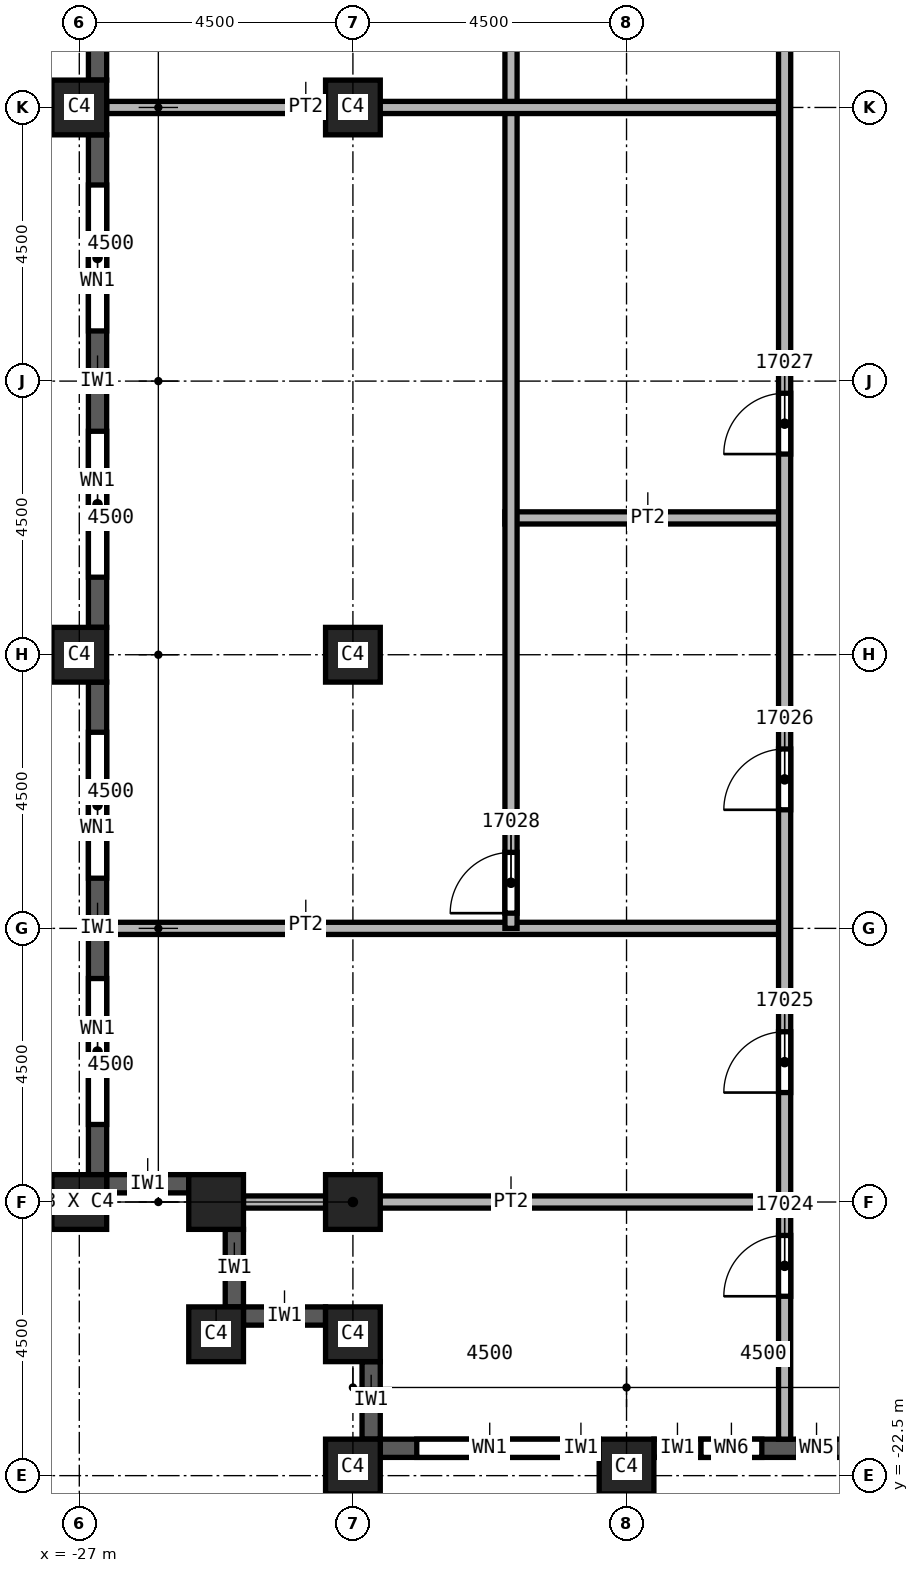
"""IFC4 building model, lengths in metres.
Left out: names, types, materials, properties, quantities, classifications, styles, units other than length and angle.
Written with IfcOpenShell. Run it as: python <this file> out.ifc"""

import sys

from ifc_helpers import new_model, si_unit, direction, frame, frame_2d, origin, origin_2d, place, context, subcontext, project, spatial, rectangle, extrude, element, fill, save


model = new_model("IFC4")
c1 = context("Model", 3, precision=1e-05, world=origin(), true_north=direction((0.0, 1.0)))
c2 = subcontext(c1, "Body", "Model", "MODEL_VIEW")
j1 = project(units=[si_unit("LENGTHUNIT", "METRE"), si_unit("PLANEANGLEUNIT", "RADIAN")], contexts=[c1])
p1 = place(None, origin())
s1 = spatial("IfcSite", under=j1, at=p1, CompositionType="ELEMENT")
p2 = place(p1, origin())
s2 = spatial("IfcBuilding", under=s1, at=p2, CompositionType="ELEMENT")
p3 = place(p2, frame((0.0, 0.0, 254.0)))
s3 = spatial("IfcBuildingStorey", under=s2, at=p3, CompositionType="ELEMENT", Elevation=254.0)
for number, where, z_axis, x_axis in (
    (1, (-22.5, 0.0, 0.0), (0.0, 0.0, 1.0), (1.0, 0.0, 0.0)),
    (2, (-22.5, -9.0, 0.0), (0.0, 0.0, 1.0), (1.0, 0.0, 0.0)),
    (3, (-22.5, -18.0, 0.0), (0.0, 0.0, 1.0), (1.0, 0.0, 0.0)),
    (4, (-18.0, -22.35, 0.0), (0.0, 0.0, 1.0), (1.0, 0.0, 0.0)),
    (5, (-22.5, -22.35, 0.0), (0.0, 0.0, 1.0), (1.0, 0.0, 0.0)),
    (6, (-27.0, 0.0, 0.0), (0.0, 0.0, 1.0), (0.0, 1.0, 0.0)),
    (7, (-27.0, -9.0, 0.0), (0.0, 0.0, 1.0), (0.0, 1.0, 0.0)),
    (8, (-27.0, -18.0, 0.0), (0.0, 0.0, 1.0), (0.0, 1.0, 0.0)),
    (9, (-22.5, -20.175, 0.0), (0.0, 0.0, 1.0), (1.0, 0.0, 0.0)),
    (10, (-24.75, -20.175, 0.0), (0.0, 0.0, 1.0), (1.0, 0.0, 0.0)),
    (11, (-24.75, -18.0, 0.0), (0.0, 0.0, 1.0), (1.0, 0.0, 0.0)),
):
    element("IfcColumn", number, at=place(p3, frame(where, z_axis=z_axis, x_axis=x_axis)), inside=s3, PredefinedType="COLUMN", context=c2, shape_type="SweptSolid", body=[
        extrude(rectangle(XDim=0.9, YDim=0.9, at=origin_2d()), origin(), (0.0, 0.0, 1.0), 3.72),
    ])
p4 = place(p3, frame((-26.7, 8.55, 0.0), z_axis=(0.0, 0.0, 1.0), x_axis=(0.0, -1.0, 0.0)))
e12 = element("IfcWall", 12, at=p4, inside=s3, PredefinedType="SOLIDWALL", context=c2, shape_type="SweptSolid", body=[
    extrude(rectangle(XDim=8.1, YDim=0.3, at=frame_2d((4.05, 0.0))), origin(), (0.0, 0.0, 1.0), 3.12),
])
p5 = place(p4, frame((0.825, 0.0, 0.8)))
e13 = element("IfcOpeningElement", 13, at=p5, cuts=e12, PredefinedType="OPENING", context=c2, shape_type="SweptSolid", body=[
    extrude(rectangle(XDim=2.4, YDim=1.95, at=frame_2d((1.2, 0.975))), frame((0.0, 0.15, 0.0), z_axis=(0.0, -1.0, 0.0), x_axis=(1.0, 0.0, 0.0)), (0.0, 0.0, 1.0), 0.3),
])
p6 = place(p4, frame((4.875, 0.0, 0.8)))
e14 = element("IfcOpeningElement", 14, at=p6, cuts=e12, PredefinedType="OPENING", context=c2, shape_type="SweptSolid", body=[
    extrude(rectangle(XDim=2.4, YDim=1.95, at=frame_2d((1.2, 0.975))), frame((0.0, 0.15, 0.0), z_axis=(0.0, -1.0, 0.0), x_axis=(1.0, 0.0, 0.0)), (0.0, 0.0, 1.0), 0.3),
])
p7 = place(p3, frame((-26.7, -0.45, 0.0), z_axis=(0.0, 0.0, 1.0), x_axis=(0.0, -1.0, 0.0)))
e15 = element("IfcWall", 15, at=p7, inside=s3, PredefinedType="SOLIDWALL", context=c2, shape_type="SweptSolid", body=[
    extrude(rectangle(XDim=8.1, YDim=0.3, at=frame_2d((4.05, 0.0))), origin(), (0.0, 0.0, 1.0), 3.12),
])
p8 = place(p7, frame((0.825, 0.0, 0.8)))
e16 = element("IfcOpeningElement", 16, at=p8, cuts=e15, PredefinedType="OPENING", context=c2, shape_type="SweptSolid", body=[
    extrude(rectangle(XDim=2.4, YDim=1.95, at=frame_2d((1.2, 0.975))), frame((0.0, 0.15, 0.0), z_axis=(0.0, -1.0, 0.0), x_axis=(1.0, 0.0, 0.0)), (0.0, 0.0, 1.0), 0.3),
])
p9 = place(p7, frame((4.875, 0.0, 0.8)))
e17 = element("IfcOpeningElement", 17, at=p9, cuts=e15, PredefinedType="OPENING", context=c2, shape_type="SweptSolid", body=[
    extrude(rectangle(XDim=2.4, YDim=1.95, at=frame_2d((1.2, 0.975))), frame((0.0, 0.15, 0.0), z_axis=(0.0, -1.0, 0.0), x_axis=(1.0, 0.0, 0.0)), (0.0, 0.0, 1.0), 0.3),
])
p10 = place(p3, frame((-26.7, -9.45, 0.0), z_axis=(0.0, 0.0, 1.0), x_axis=(0.0, -1.0, 0.0)))
e18 = element("IfcWall", 18, at=p10, inside=s3, PredefinedType="SOLIDWALL", context=c2, shape_type="SweptSolid", body=[
    extrude(rectangle(XDim=8.1, YDim=0.3, at=frame_2d((4.05, 0.0))), origin(), (0.0, 0.0, 1.0), 3.12),
])
p11 = place(p10, frame((0.825, 0.0, 0.8)))
e19 = element("IfcOpeningElement", 19, at=p11, cuts=e18, PredefinedType="OPENING", context=c2, shape_type="SweptSolid", body=[
    extrude(rectangle(XDim=2.4, YDim=1.95, at=frame_2d((1.2, 0.975))), frame((0.0, 0.15, 0.0), z_axis=(0.0, -1.0, 0.0), x_axis=(1.0, 0.0, 0.0)), (0.0, 0.0, 1.0), 0.3),
])
p12 = place(p10, frame((4.875, 0.0, 0.8)))
e20 = element("IfcOpeningElement", 20, at=p12, cuts=e18, PredefinedType="OPENING", context=c2, shape_type="SweptSolid", body=[
    extrude(rectangle(XDim=2.4, YDim=1.95, at=frame_2d((1.2, 0.975))), frame((0.0, 0.15, 0.0), z_axis=(0.0, -1.0, 0.0), x_axis=(1.0, 0.0, 0.0)), (0.0, 0.0, 1.0), 0.3),
])
p13 = place(p3, frame((-26.55, -17.7, 0.0), z_axis=(0.0, 0.0, 1.0), x_axis=(1.0, 0.0, 0.0)))
e21 = element("IfcWall", 21, at=p13, inside=s3, PredefinedType="SOLIDWALL", context=c2, shape_type="SweptSolid", body=[
    extrude(rectangle(XDim=1.35, YDim=0.3, at=frame_2d((0.675, 0.0))), origin(), (0.0, 0.0, 1.0), 3.12),
])
p14 = place(p3, frame((-24.45, -18.45, 0.0), z_axis=(0.0, 0.0, 1.0), x_axis=(0.0, -1.0, 0.0)))
e22 = element("IfcWall", 22, at=p14, inside=s3, PredefinedType="SOLIDWALL", context=c2, shape_type="SweptSolid", body=[
    extrude(rectangle(XDim=1.275, YDim=0.3, at=frame_2d((0.638, 0.0))), origin(), (0.0, 0.0, 1.0), 3.12),
])
p15 = place(p3, frame((-24.3, -19.875, 0.0), z_axis=(0.0, 0.0, 1.0), x_axis=(1.0, 0.0, 0.0)))
e23 = element("IfcWall", 23, at=p15, inside=s3, PredefinedType="SOLIDWALL", context=c2, shape_type="SweptSolid", body=[
    extrude(rectangle(XDim=1.35, YDim=0.3, at=frame_2d((0.675, 0.0))), origin(), (0.0, 0.0, 1.0), 3.12),
])
p16 = place(p3, frame((-22.2, -20.625, 0.0), z_axis=(0.0, 0.0, 1.0), x_axis=(0.0, -1.0, 0.0)))
e24 = element("IfcWall", 24, at=p16, inside=s3, PredefinedType="SOLIDWALL", context=c2, shape_type="SweptSolid", body=[
    extrude(rectangle(XDim=1.275, YDim=0.3, at=frame_2d((0.637, 0.0))), origin(), (0.0, 0.0, 1.0), 3.12),
])
p17 = place(p3, frame((-22.05, -22.05, 0.0), z_axis=(0.0, 0.0, 1.0), x_axis=(1.0, 0.0, 0.0)))
e25 = element("IfcWall", 25, at=p17, inside=s3, PredefinedType="SOLIDWALL", context=c2, shape_type="SweptSolid", body=[
    extrude(rectangle(XDim=3.6, YDim=0.3, at=frame_2d((1.8, 0.0))), origin(), (0.0, 0.0, 1.0), 3.12),
])
p18 = place(p17, frame((0.6, 0.0, 0.8)))
e26 = element("IfcOpeningElement", 26, at=p18, cuts=e25, PredefinedType="OPENING", context=c2, shape_type="SweptSolid", body=[
    extrude(rectangle(XDim=2.4, YDim=1.95, at=frame_2d((1.2, 0.975))), frame((0.0, 0.15, 0.0), z_axis=(0.0, -1.0, 0.0), x_axis=(1.0, 0.0, 0.0)), (0.0, 0.0, 1.0), 0.3),
])
p19 = place(p3, frame((-17.55, -22.05, 0.0), z_axis=(0.0, 0.0, 1.0), x_axis=(1.0, 0.0, 0.0)))
e27 = element("IfcWall", 27, at=p19, inside=s3, PredefinedType="SOLIDWALL", context=c2, shape_type="SweptSolid", body=[
    extrude(rectangle(XDim=3.6, YDim=0.3, at=frame_2d((1.8, 0.0))), origin(), (0.0, 0.0, 1.0), 3.12),
])
p20 = place(p19, frame((0.775, 0.0, 0.8)))
e28 = element("IfcOpeningElement", 28, at=p20, cuts=e27, PredefinedType="OPENING", context=c2, shape_type="SweptSolid", body=[
    extrude(rectangle(XDim=1.0, YDim=1.95, at=frame_2d((0.5, 0.975))), frame((0.0, 0.15, 0.0), z_axis=(0.0, -1.0, 0.0), x_axis=(1.0, 0.0, 0.0)), (0.0, 0.0, 1.0), 0.3),
])
p21 = place(p19, frame((2.375, 0.0, 0.8)))
e29 = element("IfcOpeningElement", 29, at=p21, cuts=e27, PredefinedType="OPENING", context=c2, shape_type="SweptSolid", body=[
    extrude(rectangle(XDim=0.6, YDim=1.95, at=frame_2d((0.3, 0.975))), frame((0.0, 0.15, 0.0), z_axis=(0.0, -1.0, 0.0), x_axis=(1.0, 0.0, 0.0)), (0.0, 0.0, 1.0), 0.3),
])
p22 = place(p3, frame((-26.55, -13.5, 0.0), z_axis=(0.0, 0.0, 1.0), x_axis=(1.0, 0.0, 0.0)))
e30 = element("IfcWall", 30, at=p22, inside=s3, PredefinedType="PARTITIONING", context=c2, shape_type="SweptSolid", body=[
    extrude(rectangle(XDim=11.15, YDim=0.2, at=frame_2d((5.575, 0.0))), origin(), (0.0, 0.0, 1.0), 3.72),
])
p23 = place(p3, frame((-24.3, -18.0, 0.0), z_axis=(0.0, 0.0, 1.0), x_axis=(1.0, 0.0, 0.0)))
e31 = element("IfcWall", 31, at=p23, inside=s3, PredefinedType="PARTITIONING", context=c2, shape_type="SweptSolid", body=[
    extrude(rectangle(XDim=8.9, YDim=0.2, at=frame_2d((4.45, 0.0))), origin(), (0.0, 0.0, 1.0), 3.72),
])
p24 = place(p3, frame((-20.0, -6.75, 0.0), z_axis=(0.0, 0.0, 1.0), x_axis=(1.0, 0.0, 0.0)))
e32 = element("IfcWall", 32, at=p24, inside=s3, PredefinedType="PARTITIONING", context=c2, shape_type="SweptSolid", body=[
    extrude(rectangle(XDim=4.6, YDim=0.2, at=frame_2d((2.3, 0.0))), origin(), (0.0, 0.0, 1.0), 3.72),
])
p25 = place(p3, frame((-19.9, -13.5, 0.0), z_axis=(0.0, 0.0, 1.0), x_axis=(0.0, 1.0, 0.0)))
e33 = element("IfcWall", 33, at=p25, inside=s3, PredefinedType="PARTITIONING", context=c2, shape_type="SweptSolid", body=[
    extrude(rectangle(XDim=27.0, YDim=0.2, at=frame_2d((13.5, 0.0))), origin(), (0.0, 0.0, 1.0), 3.72),
])
p26 = place(p25, frame((21.3, 0.0, 0.0)))
e34 = element("IfcOpeningElement", 34, at=p26, cuts=e33, PredefinedType="OPENING", context=c2, shape_type="SweptSolid", body=[
    extrude(rectangle(XDim=1.0, YDim=2.1, at=frame_2d((0.5, 1.05))), frame((0.0, 0.1, 0.0), z_axis=(0.0, -1.0, 0.0), x_axis=(1.0, 0.0, 0.0)), (0.0, 0.0, 1.0), 0.2),
])
p27 = place(p25, frame((0.25, 0.0, 0.0)))
e35 = element("IfcOpeningElement", 35, at=p27, cuts=e33, PredefinedType="OPENING", context=c2, shape_type="SweptSolid", body=[
    extrude(rectangle(XDim=1.0, YDim=2.1, at=frame_2d((0.5, 1.05))), frame((0.0, 0.1, 0.0), z_axis=(0.0, -1.0, 0.0), x_axis=(1.0, 0.0, 0.0)), (0.0, 0.0, 1.0), 0.2),
])
p28 = place(p3, frame((-15.4, 0.0, 0.0), z_axis=(0.0, 0.0, 1.0), x_axis=(-1.0, 0.0, 0.0)))
e36 = element("IfcWall", 36, at=p28, inside=s3, PredefinedType="PARTITIONING", context=c2, shape_type="SweptSolid", body=[
    extrude(rectangle(XDim=11.15, YDim=0.2, at=frame_2d((5.575, 0.0))), origin(), (0.0, 0.0, 1.0), 3.72),
])
p29 = place(p3, frame((-15.4, -21.9, 0.0), z_axis=(0.0, 0.0, 1.0), x_axis=(0.0, 1.0, 0.0)))
e37 = element("IfcWall", 37, at=p29, inside=s3, PredefinedType="PARTITIONING", context=c2, shape_type="SweptSolid", body=[
    extrude(rectangle(XDim=35.5, YDim=0.2, at=frame_2d((17.75, 0.0))), origin(), (0.0, 0.0, 1.0), 3.72),
])
p30 = place(p29, frame((24.3, 0.0, 0.0)))
e38 = element("IfcOpeningElement", 38, at=p30, cuts=e37, PredefinedType="OPENING", context=c2, shape_type="SweptSolid", body=[
    extrude(rectangle(XDim=1.0, YDim=2.1, at=frame_2d((0.5, 1.05))), frame((0.0, 0.1, 0.0), z_axis=(0.0, -1.0, 0.0), x_axis=(1.0, 0.0, 0.0)), (0.0, 0.0, 1.0), 0.2),
])
p31 = place(p29, frame((2.35, 0.0, 0.0)))
e39 = element("IfcOpeningElement", 39, at=p31, cuts=e37, PredefinedType="OPENING", context=c2, shape_type="SweptSolid", body=[
    extrude(rectangle(XDim=1.0, YDim=2.1, at=frame_2d((0.5, 1.05))), frame((0.0, 0.1, 0.0), z_axis=(0.0, -1.0, 0.0), x_axis=(1.0, 0.0, 0.0)), (0.0, 0.0, 1.0), 0.2),
])
p32 = place(p29, frame((5.7, 0.0, 0.0)))
e40 = element("IfcOpeningElement", 40, at=p32, cuts=e37, PredefinedType="OPENING", context=c2, shape_type="SweptSolid", body=[
    extrude(rectangle(XDim=1.0, YDim=2.1, at=frame_2d((0.5, 1.05))), frame((0.0, 0.1, 0.0), z_axis=(0.0, -1.0, 0.0), x_axis=(1.0, 0.0, 0.0)), (0.0, 0.0, 1.0), 0.2),
])
p33 = place(p29, frame((10.35, 0.0, 0.0)))
e41 = element("IfcOpeningElement", 41, at=p33, cuts=e37, PredefinedType="OPENING", context=c2, shape_type="SweptSolid", body=[
    extrude(rectangle(XDim=1.0, YDim=2.1, at=frame_2d((0.5, 1.05))), frame((0.0, 0.1, 0.0), z_axis=(0.0, -1.0, 0.0), x_axis=(1.0, 0.0, 0.0)), (0.0, 0.0, 1.0), 0.2),
])
p34 = place(p29, frame((16.2, 0.0, 0.0)))
e42 = element("IfcOpeningElement", 42, at=p34, cuts=e37, PredefinedType="OPENING", context=c2, shape_type="SweptSolid", body=[
    extrude(rectangle(XDim=1.0, YDim=2.1, at=frame_2d((0.5, 1.05))), frame((0.0, 0.1, 0.0), z_axis=(0.0, -1.0, 0.0), x_axis=(1.0, 0.0, 0.0)), (0.0, 0.0, 1.0), 0.2),
])
p35 = place(p8, origin())
e43 = element("IfcWindow", 43, at=p35, inside=s3, PartitioningType="SINGLE_PANEL", PredefinedType="WINDOW", context=c2, shape_type="SweptSolid", body=[
    extrude(rectangle(XDim=2.4, YDim=1.95, at=frame_2d((1.2, 0.975))), frame((0.0, 0.03, 0.0), z_axis=(0.0, -1.0, 0.0), x_axis=(1.0, 0.0, 0.0)), (0.0, 0.0, 1.0), 0.06),
])
fill(e16, e43)
p36 = place(p9, origin())
e44 = element("IfcWindow", 44, at=p36, inside=s3, PartitioningType="SINGLE_PANEL", PredefinedType="WINDOW", context=c2, shape_type="SweptSolid", body=[
    extrude(rectangle(XDim=2.4, YDim=1.95, at=frame_2d((1.2, 0.975))), frame((0.0, 0.03, 0.0), z_axis=(0.0, -1.0, 0.0), x_axis=(1.0, 0.0, 0.0)), (0.0, 0.0, 1.0), 0.06),
])
fill(e17, e44)
p37 = place(p11, origin())
e45 = element("IfcWindow", 45, at=p37, inside=s3, PartitioningType="SINGLE_PANEL", PredefinedType="WINDOW", context=c2, shape_type="SweptSolid", body=[
    extrude(rectangle(XDim=2.4, YDim=1.95, at=frame_2d((1.2, 0.975))), frame((0.0, 0.03, 0.0), z_axis=(0.0, -1.0, 0.0), x_axis=(1.0, 0.0, 0.0)), (0.0, 0.0, 1.0), 0.06),
])
fill(e19, e45)
p38 = place(p12, origin())
e46 = element("IfcWindow", 46, at=p38, inside=s3, PartitioningType="SINGLE_PANEL", PredefinedType="WINDOW", context=c2, shape_type="SweptSolid", body=[
    extrude(rectangle(XDim=2.4, YDim=1.95, at=frame_2d((1.2, 0.975))), frame((0.0, 0.03, 0.0), z_axis=(0.0, -1.0, 0.0), x_axis=(1.0, 0.0, 0.0)), (0.0, 0.0, 1.0), 0.06),
])
fill(e20, e46)
p39 = place(p18, origin())
e47 = element("IfcWindow", 47, at=p39, inside=s3, PartitioningType="SINGLE_PANEL", PredefinedType="WINDOW", context=c2, shape_type="SweptSolid", body=[
    extrude(rectangle(XDim=2.4, YDim=1.95, at=frame_2d((1.2, 0.975))), frame((0.0, 0.03, 0.0), z_axis=(0.0, -1.0, 0.0), x_axis=(1.0, 0.0, 0.0)), (0.0, 0.0, 1.0), 0.06),
])
fill(e26, e47)
p40 = place(p31, origin())
e48 = element("IfcDoor", 48, at=p40, inside=s3, OperationType="SINGLE_SWING_LEFT", PredefinedType="DOOR", context=c2, shape_type="SweptSolid", body=[
    extrude(rectangle(XDim=1.0, YDim=2.1, at=frame_2d((0.5, 1.05))), frame((0.0, 0.025, 0.0), z_axis=(0.0, -1.0, 0.0), x_axis=(1.0, 0.0, 0.0)), (0.0, 0.0, 1.0), 0.05),
])
fill(e39, e48)
p41 = place(p32, origin())
e49 = element("IfcDoor", 49, at=p41, inside=s3, OperationType="SINGLE_SWING_RIGHT", PredefinedType="DOOR", context=c2, shape_type="SweptSolid", body=[
    extrude(rectangle(XDim=1.0, YDim=2.1, at=frame_2d((0.5, 1.05))), frame((0.0, 0.025, 0.0), z_axis=(0.0, -1.0, 0.0), x_axis=(1.0, 0.0, 0.0)), (0.0, 0.0, 1.0), 0.05),
])
fill(e40, e49)
p42 = place(p33, origin())
e50 = element("IfcDoor", 50, at=p42, inside=s3, OperationType="SINGLE_SWING_LEFT", PredefinedType="DOOR", context=c2, shape_type="SweptSolid", body=[
    extrude(rectangle(XDim=1.0, YDim=2.1, at=frame_2d((0.5, 1.05))), frame((0.0, 0.025, 0.0), z_axis=(0.0, -1.0, 0.0), x_axis=(1.0, 0.0, 0.0)), (0.0, 0.0, 1.0), 0.05),
])
fill(e41, e50)
p43 = place(p34, origin())
e51 = element("IfcDoor", 51, at=p43, inside=s3, OperationType="SINGLE_SWING_RIGHT", PredefinedType="DOOR", context=c2, shape_type="SweptSolid", body=[
    extrude(rectangle(XDim=1.0, YDim=2.1, at=frame_2d((0.5, 1.05))), frame((0.0, 0.025, 0.0), z_axis=(0.0, -1.0, 0.0), x_axis=(1.0, 0.0, 0.0)), (0.0, 0.0, 1.0), 0.05),
])
fill(e42, e51)
p44 = place(p27, origin())
e52 = element("IfcDoor", 52, at=p44, inside=s3, OperationType="SINGLE_SWING_LEFT", PredefinedType="DOOR", context=c2, shape_type="SweptSolid", body=[
    extrude(rectangle(XDim=1.0, YDim=2.1, at=frame_2d((0.5, 1.05))), frame((0.0, 0.025, 0.0), z_axis=(0.0, -1.0, 0.0), x_axis=(1.0, 0.0, 0.0)), (0.0, 0.0, 1.0), 0.05),
])
fill(e35, e52)
p45 = place(p20, origin())
e53 = element("IfcWindow", 53, at=p45, inside=s3, PartitioningType="SINGLE_PANEL", PredefinedType="WINDOW", context=c2, shape_type="SweptSolid", body=[
    extrude(rectangle(XDim=1.0, YDim=1.95, at=frame_2d((0.5, 0.975))), frame((0.0, 0.03, 0.0), z_axis=(0.0, -1.0, 0.0), x_axis=(1.0, 0.0, 0.0)), (0.0, 0.0, 1.0), 0.06),
])
fill(e28, e53)
p46 = place(p21, origin())
e54 = element("IfcWindow", 54, at=p46, inside=s3, PartitioningType="SINGLE_PANEL", PredefinedType="WINDOW", context=c2, shape_type="SweptSolid", body=[
    extrude(rectangle(XDim=0.6, YDim=1.95, at=frame_2d((0.3, 0.975))), frame((0.0, 0.03, 0.0), z_axis=(0.0, -1.0, 0.0), x_axis=(1.0, 0.0, 0.0)), (0.0, 0.0, 1.0), 0.06),
])
fill(e29, e54)
save(model, sys.argv[1])
